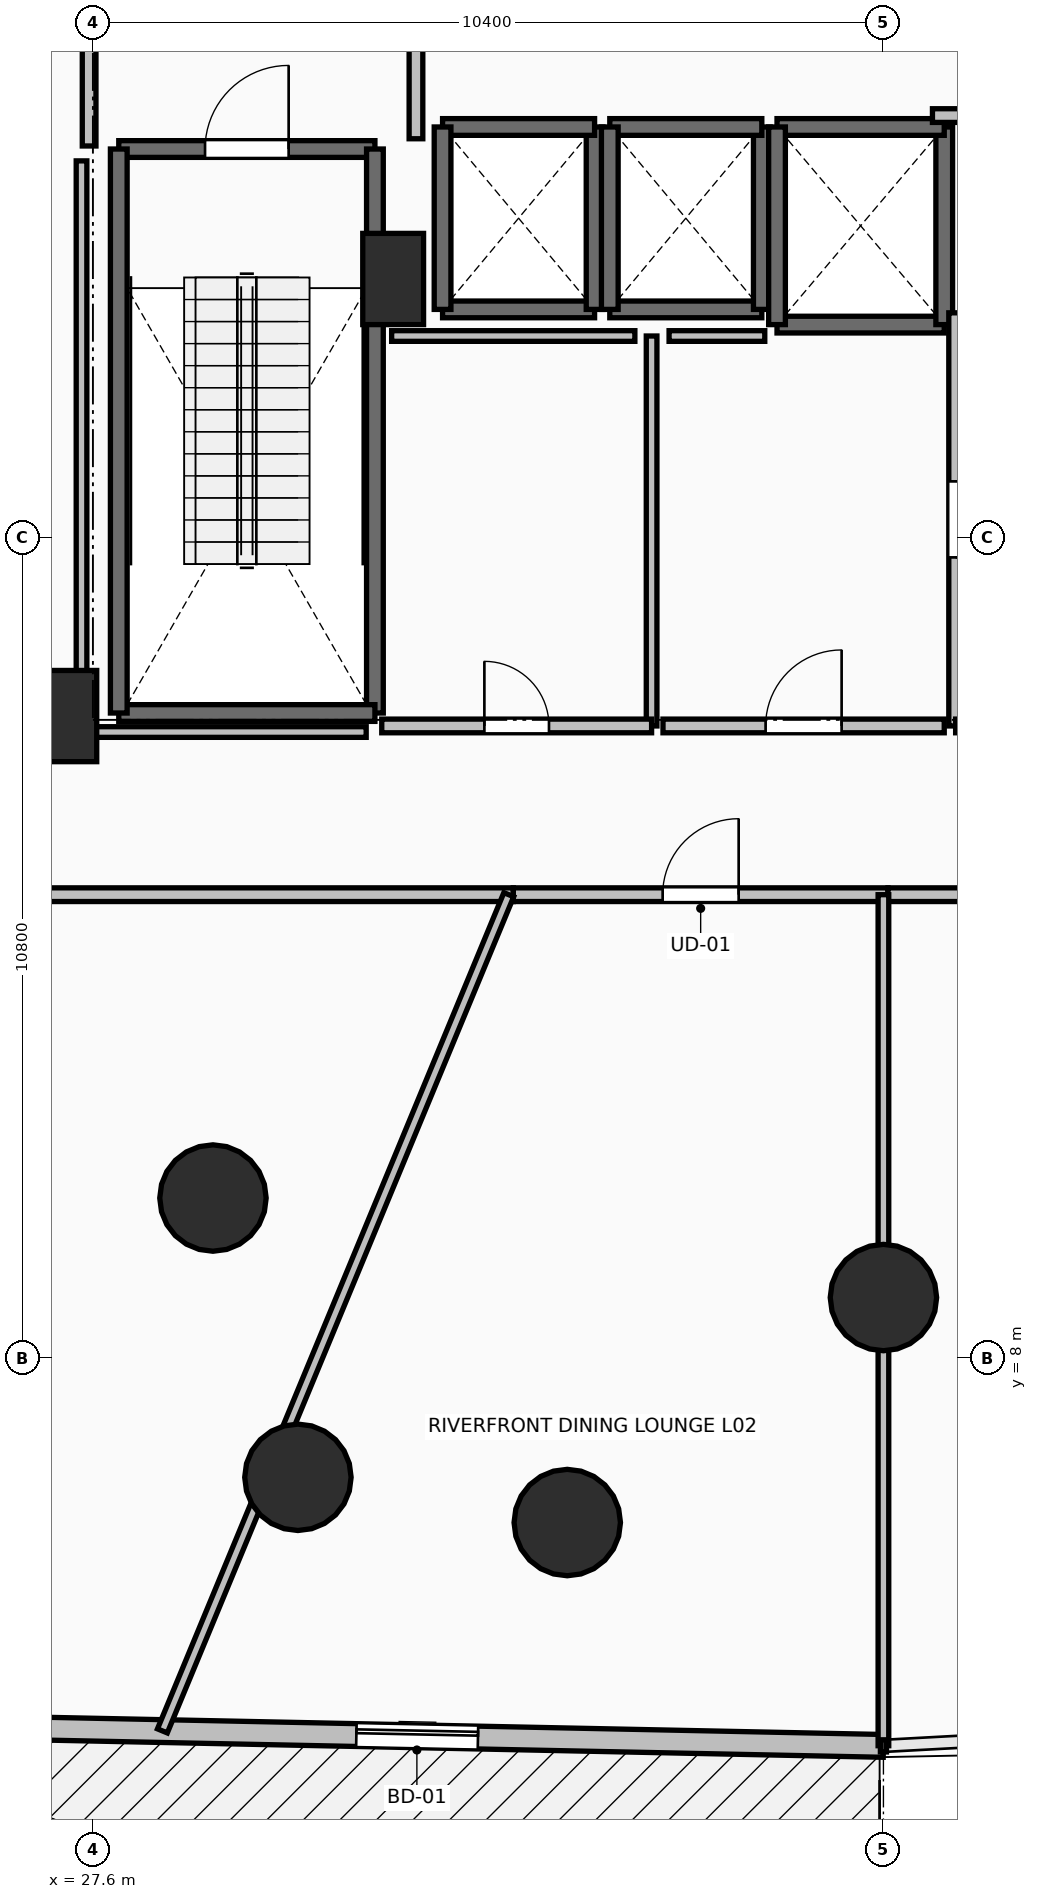
"""IFC4 building model, lengths in metres.
Left out: names, types, materials, properties, quantities, classifications, styles, units other than length and angle.
Written with IfcOpenShell. Run it as: python <this file> out.ifc"""

import sys

from ifc_helpers import new_model, si_unit, direction, frame, frame_2d, origin, origin_2d, place, context, subcontext, project, spatial, rectangle, circle, extrude, element, fill, save


model = new_model("IFC4")
c1 = context("Model", 3, precision=1e-05, world=origin(), true_north=direction((0.0, 1.0)))
c2 = subcontext(c1, "Body", "Model", "MODEL_VIEW")
j1 = project(units=[si_unit("LENGTHUNIT", "METRE"), si_unit("PLANEANGLEUNIT", "RADIAN")], contexts=[c1])
p1 = place(None, origin())
s1 = spatial("IfcSite", under=j1, at=p1, CompositionType="ELEMENT")
p2 = place(p1, origin())
s2 = spatial("IfcBuilding", under=s1, at=p2, CompositionType="ELEMENT")
p3 = place(p2, frame((0.0, 0.0, 9.6)))
s3 = spatial("IfcBuildingStorey", under=s2, at=p3, CompositionType="ELEMENT", Elevation=9.6)
for number, where, z_axis, x_axis in (
    (1, (29.179, 10.109, 0.0), (0.0, 0.0, 1.0), (-0.383, -0.924, 0.0)),
    (2, (38.0, 8.8, 0.0), (0.0, 0.0, 1.0), (0.0, -1.0, 0.0)),
    (3, (30.297, 6.435, 0.0), (0.0, 0.0, 1.0), (-0.383, -0.924, 0.0)),
    (4, (33.84, 5.84, 0.0), (0.0, 0.0, 1.0), (0.0, -1.0, 0.0)),
):
    element("IfcColumn", number, at=place(p3, frame(where, z_axis=z_axis, x_axis=x_axis)), inside=s3, PredefinedType="COLUMN", context=c2, shape_type="SweptSolid", body=[
        extrude(circle(Radius=0.7, at=origin_2d()), origin(), (0.0, 0.0, 1.0), 4.8),
    ])
for number, where, z_axis, x_axis in (
    (5, (27.25, 16.45, 0.0), (0.0, 0.0, 1.0), (1.0, 0.0, 0.0)),
    (6, (31.55, 22.2, 0.0), (0.0, 0.0, 1.0), (1.0, 0.0, 0.0)),
):
    element("IfcColumn", number, at=place(p3, frame(where, z_axis=z_axis, x_axis=x_axis)), inside=s3, PredefinedType="PILASTER", context=c2, shape_type="SweptSolid", body=[
        extrude(rectangle(XDim=0.8, YDim=1.2, at=origin_2d()), origin(), (0.0, 0.0, 1.0), 4.8),
    ])
p4 = place(p3, frame((25.732, 3.154, 0.0), z_axis=(0.0, 0.0, 1.0), x_axis=(0.99978877583, -0.020552462746, 0.0)))
e7 = element("IfcWall", 7, at=p4, inside=s3, PredefinedType="STANDARD", context=c2, shape_type="SweptSolid", body=[
    extrude(rectangle(XDim=12.271, YDim=0.3, at=frame_2d((6.135, 0.0))), origin(), (0.0, 0.0, 1.0), 4.48),
])
p5 = place(p4, frame((5.335, 0.0, 0.0)))
e8 = element("IfcOpeningElement", 8, at=p5, cuts=e7, PredefinedType="OPENING", context=c2, shape_type="SweptSolid", body=[
    extrude(rectangle(XDim=1.6, YDim=2.3, at=frame_2d((0.8, 1.15))), frame((0.0, 0.165, 0.0), z_axis=(0.0, -1.0, 0.0), x_axis=(1.0, 0.0, 0.0)), (0.0, 0.0, 1.0), 0.33),
])
p6 = place(p3, frame((27.94, 23.91, 0.0), z_axis=(0.0, 0.0, 1.0), x_axis=(1.0, 0.0, 0.0)))
e9 = element("IfcWall", 9, at=p6, inside=s3, PredefinedType="SOLIDWALL", context=c2, shape_type="SweptSolid", body=[
    extrude(rectangle(XDim=3.37, YDim=0.22, at=frame_2d((1.685, 0.0))), origin(), (0.0, 0.0, 1.0), 4.48),
])
p7 = place(p6, frame((1.135, 0.0, 0.0)))
e10 = element("IfcOpeningElement", 10, at=p7, cuts=e9, PredefinedType="OPENING", context=c2, shape_type="SweptSolid", body=[
    extrude(rectangle(XDim=1.1, YDim=2.15, at=frame_2d((0.55, 1.075))), frame((0.0, 0.125, 0.0), z_axis=(0.0, -1.0, 0.0), x_axis=(1.0, 0.0, 0.0)), (0.0, 0.0, 1.0), 0.25),
])
p8 = place(p3, frame((31.31, 23.91, 0.0), z_axis=(0.0, 0.0, 1.0), x_axis=(0.0, -1.0, 0.0)))
e11 = element("IfcWall", 11, at=p8, inside=s3, PredefinedType="SOLIDWALL", context=c2, shape_type="SweptSolid", body=[
    extrude(rectangle(XDim=7.42, YDim=0.22, at=frame_2d((3.71, 0.0))), origin(), (0.0, 0.0, 1.0), 4.48),
])
p9 = place(p3, frame((31.31, 16.49, 0.0), z_axis=(0.0, 0.0, 1.0), x_axis=(-1.0, 0.0, 0.0)))
e12 = element("IfcWall", 12, at=p9, inside=s3, PredefinedType="SOLIDWALL", context=c2, shape_type="SweptSolid", body=[
    extrude(rectangle(XDim=3.37, YDim=0.22, at=frame_2d((1.685, 0.0))), origin(), (0.0, 0.0, 1.0), 4.48),
])
p10 = place(p3, frame((27.94, 16.49, 0.0), z_axis=(0.0, 0.0, 1.0), x_axis=(0.0, 1.0, 0.0)))
e13 = element("IfcWall", 13, at=p10, inside=s3, PredefinedType="SOLIDWALL", context=c2, shape_type="SweptSolid", body=[
    extrude(rectangle(XDim=7.42, YDim=0.22, at=frame_2d((3.71, 0.0))), origin(), (0.0, 0.0, 1.0), 4.48),
])
p11 = place(p3, frame((32.2, 21.8, 0.0), z_axis=(0.0, 0.0, 1.0), x_axis=(1.0, 0.0, 0.0)))
e14 = element("IfcWall", 14, at=p11, inside=s3, PredefinedType="SOLIDWALL", context=c2, shape_type="SweptSolid", body=[
    extrude(rectangle(XDim=2.0, YDim=0.22, at=frame_2d((1.0, 0.0))), origin(), (0.0, 0.0, 1.0), 4.48),
])
p12 = place(p3, frame((34.2, 21.8, 0.0), z_axis=(0.0, 0.0, 1.0), x_axis=(0.0, 1.0, 0.0)))
e15 = element("IfcWall", 15, at=p12, inside=s3, PredefinedType="SOLIDWALL", context=c2, shape_type="SweptSolid", body=[
    extrude(rectangle(XDim=2.4, YDim=0.22, at=frame_2d((1.2, 0.0))), origin(), (0.0, 0.0, 1.0), 4.48),
])
p13 = place(p3, frame((34.2, 24.2, 0.0), z_axis=(0.0, 0.0, 1.0), x_axis=(-1.0, 0.0, 0.0)))
e16 = element("IfcWall", 16, at=p13, inside=s3, PredefinedType="SOLIDWALL", context=c2, shape_type="SweptSolid", body=[
    extrude(rectangle(XDim=2.0, YDim=0.22, at=frame_2d((1.0, 0.0))), origin(), (0.0, 0.0, 1.0), 4.48),
])
p14 = place(p3, frame((32.2, 24.2, 0.0), z_axis=(0.0, 0.0, 1.0), x_axis=(0.0, -1.0, 0.0)))
e17 = element("IfcWall", 17, at=p14, inside=s3, PredefinedType="SOLIDWALL", context=c2, shape_type="SweptSolid", body=[
    extrude(rectangle(XDim=2.4, YDim=0.22, at=frame_2d((1.2, 0.0))), origin(), (0.0, 0.0, 1.0), 4.48),
])
p15 = place(p3, frame((34.4, 21.8, 0.0), z_axis=(0.0, 0.0, 1.0), x_axis=(1.0, 0.0, 0.0)))
e18 = element("IfcWall", 18, at=p15, inside=s3, PredefinedType="SOLIDWALL", context=c2, shape_type="SweptSolid", body=[
    extrude(rectangle(XDim=2.0, YDim=0.22, at=frame_2d((1.0, 0.0))), origin(), (0.0, 0.0, 1.0), 4.48),
])
p16 = place(p3, frame((36.4, 21.8, 0.0), z_axis=(0.0, 0.0, 1.0), x_axis=(0.0, 1.0, 0.0)))
e19 = element("IfcWall", 19, at=p16, inside=s3, PredefinedType="SOLIDWALL", context=c2, shape_type="SweptSolid", body=[
    extrude(rectangle(XDim=2.4, YDim=0.22, at=frame_2d((1.2, 0.0))), origin(), (0.0, 0.0, 1.0), 4.48),
])
p17 = place(p3, frame((36.4, 24.2, 0.0), z_axis=(0.0, 0.0, 1.0), x_axis=(-1.0, 0.0, 0.0)))
e20 = element("IfcWall", 20, at=p17, inside=s3, PredefinedType="SOLIDWALL", context=c2, shape_type="SweptSolid", body=[
    extrude(rectangle(XDim=2.0, YDim=0.22, at=frame_2d((1.0, 0.0))), origin(), (0.0, 0.0, 1.0), 4.48),
])
p18 = place(p3, frame((34.4, 24.2, 0.0), z_axis=(0.0, 0.0, 1.0), x_axis=(0.0, -1.0, 0.0)))
e21 = element("IfcWall", 21, at=p18, inside=s3, PredefinedType="SOLIDWALL", context=c2, shape_type="SweptSolid", body=[
    extrude(rectangle(XDim=2.4, YDim=0.22, at=frame_2d((1.2, 0.0))), origin(), (0.0, 0.0, 1.0), 4.48),
])
p19 = place(p3, frame((36.6, 21.6, 0.0), z_axis=(0.0, 0.0, 1.0), x_axis=(1.0, 0.0, 0.0)))
e22 = element("IfcWall", 22, at=p19, inside=s3, PredefinedType="SOLIDWALL", context=c2, shape_type="SweptSolid", body=[
    extrude(rectangle(XDim=2.2, YDim=0.22, at=frame_2d((1.1, 0.0))), origin(), (0.0, 0.0, 1.0), 4.48),
])
p20 = place(p3, frame((38.8, 21.6, 0.0), z_axis=(0.0, 0.0, 1.0), x_axis=(0.0, 1.0, 0.0)))
e23 = element("IfcWall", 23, at=p20, inside=s3, PredefinedType="SOLIDWALL", context=c2, shape_type="SweptSolid", body=[
    extrude(rectangle(XDim=2.6, YDim=0.22, at=frame_2d((1.3, 0.0))), origin(), (0.0, 0.0, 1.0), 4.48),
])
p21 = place(p3, frame((38.8, 24.2, 0.0), z_axis=(0.0, 0.0, 1.0), x_axis=(-1.0, 0.0, 0.0)))
e24 = element("IfcWall", 24, at=p21, inside=s3, PredefinedType="SOLIDWALL", context=c2, shape_type="SweptSolid", body=[
    extrude(rectangle(XDim=2.2, YDim=0.22, at=frame_2d((1.1, 0.0))), origin(), (0.0, 0.0, 1.0), 4.48),
])
p22 = place(p3, frame((36.6, 24.2, 0.0), z_axis=(0.0, 0.0, 1.0), x_axis=(0.0, -1.0, 0.0)))
e25 = element("IfcWall", 25, at=p22, inside=s3, PredefinedType="SOLIDWALL", context=c2, shape_type="SweptSolid", body=[
    extrude(rectangle(XDim=2.6, YDim=0.22, at=frame_2d((1.3, 0.0))), origin(), (0.0, 0.0, 1.0), 4.48),
])
p23 = place(p3, frame((31.85, 24.045, 0.0), z_axis=(0.0, 0.0, 1.0), x_axis=(0.0, 1.0, 0.0)))
e26 = element("IfcWall", 26, at=p23, inside=s3, PredefinedType="PARTITIONING", context=c2, shape_type="SweptSolid", body=[
    extrude(rectangle(XDim=3.91, YDim=0.18, at=frame_2d((1.955, 0.0))), origin(), (0.0, 0.0, 1.0), 4.48),
])
p24 = place(p23, frame((1.355, 0.0, 0.0)))
e27 = element("IfcOpeningElement", 27, at=p24, cuts=e26, PredefinedType="OPENING", context=c2, shape_type="SweptSolid", body=[
    extrude(rectangle(XDim=1.2, YDim=2.15, at=frame_2d((0.6, 1.075))), frame((0.0, 0.105, 0.0), z_axis=(0.0, -1.0, 0.0), x_axis=(1.0, 0.0, 0.0)), (0.0, 0.0, 1.0), 0.21),
])
p25 = place(p3, frame((27.55, 28.0, 0.0), z_axis=(0.0, 0.0, 1.0), x_axis=(0.0, -1.0, 0.0)))
e28 = element("IfcWall", 28, at=p25, inside=s3, PredefinedType="PARTITIONING", context=c2, shape_type="SweptSolid", body=[
    extrude(rectangle(XDim=4.05, YDim=0.18, at=frame_2d((2.025, 0.0))), origin(), (0.0, 0.0, 1.0), 4.48),
])
p26 = place(p25, frame((1.425, 0.0, 0.0)))
e29 = element("IfcOpeningElement", 29, at=p26, cuts=e28, PredefinedType="OPENING", context=c2, shape_type="SweptSolid", body=[
    extrude(rectangle(XDim=1.2, YDim=2.15, at=frame_2d((0.6, 1.075))), frame((0.0, 0.105, 0.0), z_axis=(0.0, -1.0, 0.0), x_axis=(1.0, 0.0, 0.0)), (0.0, 0.0, 1.0), 0.21),
])
p27 = place(p3, frame((38.645, 24.35, 0.0), z_axis=(0.0, 0.0, 1.0), x_axis=(1.0, 0.0, 0.0)))
e30 = element("IfcWall", 30, at=p27, inside=s3, PredefinedType="PARTITIONING", context=c2, shape_type="SweptSolid", body=[
    extrude(rectangle(XDim=2.91, YDim=0.18, at=frame_2d((1.455, 0.0))), origin(), (0.0, 0.0, 1.0), 4.48),
])
p28 = place(p27, frame((0.855, 0.0, 0.0)))
e31 = element("IfcOpeningElement", 31, at=p28, cuts=e30, PredefinedType="OPENING", context=c2, shape_type="SweptSolid", body=[
    extrude(rectangle(XDim=1.2, YDim=2.15, at=frame_2d((0.6, 1.075))), frame((0.0, 0.105, 0.0), z_axis=(0.0, -1.0, 0.0), x_axis=(1.0, 0.0, 0.0)), (0.0, 0.0, 1.0), 0.21),
])
p29 = place(p3, frame((38.95, 21.755, 0.0), z_axis=(0.0, 0.0, 1.0), x_axis=(0.0, -1.0, 0.0)))
e32 = element("IfcWall", 32, at=p29, inside=s3, PredefinedType="PARTITIONING", context=c2, shape_type="SweptSolid", body=[
    extrude(rectangle(XDim=5.435, YDim=0.18, at=frame_2d((2.717, 0.0))), origin(), (0.0, 0.0, 1.0), 4.48),
])
p30 = place(p29, frame((2.218, 0.0, 0.0)))
e33 = element("IfcOpeningElement", 33, at=p30, cuts=e32, PredefinedType="OPENING", context=c2, shape_type="SweptSolid", body=[
    extrude(rectangle(XDim=1.0, YDim=2.15, at=frame_2d((0.5, 1.075))), frame((0.0, 0.105, 0.0), z_axis=(0.0, -1.0, 0.0), x_axis=(1.0, 0.0, 0.0)), (0.0, 0.0, 1.0), 0.21),
])
p31 = place(p3, frame((38.95, 16.32, 0.0), z_axis=(0.0, 0.0, 1.0), x_axis=(1.0, 0.0, 0.0)))
e34 = element("IfcWall", 34, at=p31, inside=s3, PredefinedType="PARTITIONING", context=c2, shape_type="SweptSolid", body=[
    extrude(rectangle(XDim=2.3, YDim=0.18, at=frame_2d((1.15, 0.0))), origin(), (0.0, 0.0, 1.0), 4.48),
])
p32 = place(p31, frame((0.55, 0.0, 0.0)))
e35 = element("IfcOpeningElement", 35, at=p32, cuts=e34, PredefinedType="OPENING", context=c2, shape_type="SweptSolid", body=[
    extrude(rectangle(XDim=1.2, YDim=2.15, at=frame_2d((0.6, 1.075))), frame((0.0, 0.105, 0.0), z_axis=(0.0, -1.0, 0.0), x_axis=(1.0, 0.0, 0.0)), (0.0, 0.0, 1.0), 0.21),
])
p33 = place(p3, frame((34.95, 16.32, 0.0), z_axis=(0.0, 0.0, 1.0), x_axis=(0.0, 1.0, 0.0)))
e36 = element("IfcWall", 36, at=p33, inside=s3, PredefinedType="PARTITIONING", context=c2, shape_type="SweptSolid", body=[
    extrude(rectangle(XDim=5.13, YDim=0.14, at=frame_2d((2.565, 0.0))), origin(), (0.0, 0.0, 1.0), 4.48),
])
p34 = place(p3, frame((31.4, 16.32, 0.0), z_axis=(0.0, 0.0, 1.0), x_axis=(1.0, 0.0, 0.0)))
e37 = element("IfcWall", 37, at=p34, inside=s3, PredefinedType="PARTITIONING", context=c2, shape_type="SweptSolid", body=[
    extrude(rectangle(XDim=3.55, YDim=0.18, at=frame_2d((1.775, 0.0))), origin(), (0.0, 0.0, 1.0), 4.48),
])
p35 = place(p34, frame((1.35, 0.0, 0.0)))
e38 = element("IfcOpeningElement", 38, at=p35, cuts=e37, PredefinedType="OPENING", context=c2, shape_type="SweptSolid", body=[
    extrude(rectangle(XDim=0.85, YDim=2.1, at=frame_2d((0.425, 1.05))), frame((0.0, 0.105, 0.0), z_axis=(0.0, -1.0, 0.0), x_axis=(1.0, 0.0, 0.0)), (0.0, 0.0, 1.0), 0.21),
])
p36 = place(p3, frame((35.1, 16.32, 0.0), z_axis=(0.0, 0.0, 1.0), x_axis=(1.0, 0.0, 0.0)))
e39 = element("IfcWall", 39, at=p36, inside=s3, PredefinedType="PARTITIONING", context=c2, shape_type="SweptSolid", body=[
    extrude(rectangle(XDim=3.7, YDim=0.18, at=frame_2d((1.85, 0.0))), origin(), (0.0, 0.0, 1.0), 4.48),
])
p37 = place(p36, frame((1.35, 0.0, 0.0)))
e40 = element("IfcOpeningElement", 40, at=p37, cuts=e39, PredefinedType="OPENING", context=c2, shape_type="SweptSolid", body=[
    extrude(rectangle(XDim=1.0, YDim=2.15, at=frame_2d((0.5, 1.075))), frame((0.0, 0.105, 0.0), z_axis=(0.0, -1.0, 0.0), x_axis=(1.0, 0.0, 0.0)), (0.0, 0.0, 1.0), 0.21),
])
p38 = place(p3, frame((25.25, 14.1, 0.0), z_axis=(0.0, 0.0, 1.0), x_axis=(1.0, 0.0, 0.0)))
e41 = element("IfcWall", 41, at=p38, inside=s3, PredefinedType="PARTITIONING", context=c2, shape_type="SweptSolid", body=[
    extrude(rectangle(XDim=7.881, YDim=0.18, at=frame_2d((3.94, 0.0))), origin(), (0.0, 0.0, 1.0), 3.672),
])
p39 = place(p3, frame((33.131, 14.1, 0.0), z_axis=(0.0, 0.0, 1.0), x_axis=(1.0, 0.0, 0.0)))
e42 = element("IfcWall", 42, at=p39, inside=s3, PredefinedType="PARTITIONING", context=c2, shape_type="SweptSolid", body=[
    extrude(rectangle(XDim=4.929, YDim=0.18, at=frame_2d((2.464, 0.0))), origin(), (0.0, 0.0, 1.0), 4.48),
])
p40 = place(p39, frame((1.965, 0.0, 0.0)))
e43 = element("IfcOpeningElement", 43, at=p40, cuts=e42, PredefinedType="OPENING", context=c2, shape_type="SweptSolid", body=[
    extrude(rectangle(XDim=1.0, YDim=2.15, at=frame_2d((0.5, 1.075))), frame((0.0, 0.105, 0.0), z_axis=(0.0, -1.0, 0.0), x_axis=(1.0, 0.0, 0.0)), (0.0, 0.0, 1.0), 0.21),
])
p41 = place(p3, frame((38.06, 14.1, 0.0), z_axis=(0.0, 0.0, 1.0), x_axis=(1.0, 0.0, 0.0)))
e44 = element("IfcWall", 44, at=p41, inside=s3, PredefinedType="PARTITIONING", context=c2, shape_type="SweptSolid", body=[
    extrude(rectangle(XDim=4.14, YDim=0.18, at=frame_2d((2.07, 0.0))), origin(), (0.0, 0.0, 1.0), 4.48),
])
p42 = place(p41, frame((1.57, 0.0, 0.0)))
e45 = element("IfcOpeningElement", 45, at=p42, cuts=e44, PredefinedType="OPENING", context=c2, shape_type="SweptSolid", body=[
    extrude(rectangle(XDim=1.0, YDim=2.15, at=frame_2d((0.5, 1.075))), frame((0.0, 0.105, 0.0), z_axis=(0.0, -1.0, 0.0), x_axis=(1.0, 0.0, 0.0)), (0.0, 0.0, 1.0), 0.21),
])
p43 = place(p3, frame((28.514, 3.099, 0.0), z_axis=(0.0, 0.0, 1.0), x_axis=(0.38271032831, 0.923868391388, 0.0)))
e46 = element("IfcWall", 46, at=p43, inside=s3, PredefinedType="PARTITIONING", context=c2, shape_type="SweptSolid", body=[
    extrude(rectangle(XDim=11.907, YDim=0.14, at=frame_2d((5.954, 0.0))), origin(), (0.0, 0.0, 1.0), 3.672),
])
p44 = place(p3, frame((38.0, 2.904, 0.0), z_axis=(0.0, 0.0, 1.0), x_axis=(0.0, 1.0, 0.0)))
e47 = element("IfcWall", 47, at=p44, inside=s3, PredefinedType="PARTITIONING", context=c2, shape_type="SweptSolid", body=[
    extrude(rectangle(XDim=11.196, YDim=0.14, at=frame_2d((5.598, 0.0))), origin(), (0.0, 0.0, 1.0), 3.672),
])
p45 = place(p3, frame((34.73, 21.45, 0.0), z_axis=(0.0, 0.0, 1.0), x_axis=(-1.0, 0.0, 0.0)))
e48 = element("IfcWall", 48, at=p45, inside=s3, PredefinedType="PARTITIONING", context=c2, shape_type="SweptSolid", body=[
    extrude(rectangle(XDim=3.2, YDim=0.14, at=frame_2d((1.6, 0.0))), origin(), (0.0, 0.0, 1.0), 4.48),
])
p46 = place(p3, frame((36.439, 21.45, 0.0), z_axis=(0.0, 0.0, 1.0), x_axis=(-1.0, 0.0, 0.0)))
e49 = element("IfcWall", 49, at=p46, inside=s3, PredefinedType="PARTITIONING", context=c2, shape_type="SweptSolid", body=[
    extrude(rectangle(XDim=1.259, YDim=0.14, at=frame_2d((0.629, 0.0))), origin(), (0.0, 0.0, 1.0), 4.48),
])
p47 = place(p3, frame((31.195, 16.24, 0.0), z_axis=(0.0, 0.0, 1.0), x_axis=(-1.0, 0.0, 0.0)))
e50 = element("IfcWall", 50, at=p47, inside=s3, PredefinedType="PARTITIONING", context=c2, shape_type="SweptSolid", body=[
    extrude(rectangle(XDim=3.745, YDim=0.14, at=frame_2d((1.873, 0.0))), origin(), (0.0, 0.0, 1.0), 3.672),
])
p48 = place(p3, frame((27.45, 16.24, 0.0), z_axis=(0.0, 0.0, 1.0), x_axis=(0.0, 1.0, 0.0)))
e51 = element("IfcWall", 51, at=p48, inside=s3, PredefinedType="PARTITIONING", context=c2, shape_type="SweptSolid", body=[
    extrude(rectangle(XDim=7.514, YDim=0.14, at=frame_2d((3.757, 0.0))), origin(), (0.0, 0.0, 1.0), 2.406),
])
p49 = place(p5, origin())
e52 = element("IfcDoor", 52, at=p49, inside=s3, OperationType="SLIDING_TO_LEFT", PredefinedType="DOOR", context=c2, shape_type="SweptSolid", body=[
    extrude(rectangle(XDim=1.6, YDim=2.3, at=frame_2d((0.8, 1.15))), frame((0.0, 0.025, 0.0), z_axis=(0.0, -1.0, 0.0), x_axis=(1.0, 0.0, 0.0)), (0.0, 0.0, 1.0), 0.05),
])
fill(e8, e52)
p50 = place(p7, origin())
e53 = element("IfcDoor", 53, at=p50, inside=s3, OperationType="SINGLE_SWING_RIGHT", PredefinedType="DOOR", context=c2, shape_type="SweptSolid", body=[
    extrude(rectangle(XDim=1.1, YDim=2.15, at=frame_2d((0.55, 1.075))), frame((0.0, 0.025, 0.0), z_axis=(0.0, -1.0, 0.0), x_axis=(1.0, 0.0, 0.0)), (0.0, 0.0, 1.0), 0.05),
])
fill(e10, e53)
p51 = place(p30, origin())
e54 = element("IfcDoor", 54, at=p51, inside=s3, OperationType="SINGLE_SWING_RIGHT", PredefinedType="DOOR", context=c2, shape_type="SweptSolid", body=[
    extrude(rectangle(XDim=1.0, YDim=2.15, at=frame_2d((0.5, 1.075))), frame((0.0, 0.025, 0.0), z_axis=(0.0, -1.0, 0.0), x_axis=(1.0, 0.0, 0.0)), (0.0, 0.0, 1.0), 0.05),
])
fill(e33, e54)
p52 = place(p35, origin())
e55 = element("IfcDoor", 55, at=p52, inside=s3, OperationType="SINGLE_SWING_LEFT", PredefinedType="DOOR", context=c2, shape_type="SweptSolid", body=[
    extrude(rectangle(XDim=0.85, YDim=2.1, at=frame_2d((0.425, 1.05))), frame((0.0, 0.025, 0.0), z_axis=(0.0, -1.0, 0.0), x_axis=(1.0, 0.0, 0.0)), (0.0, 0.0, 1.0), 0.05),
])
fill(e38, e55)
p53 = place(p37, origin())
e56 = element("IfcDoor", 56, at=p53, inside=s3, OperationType="SINGLE_SWING_RIGHT", PredefinedType="DOOR", context=c2, shape_type="SweptSolid", body=[
    extrude(rectangle(XDim=1.0, YDim=2.15, at=frame_2d((0.5, 1.075))), frame((0.0, 0.025, 0.0), z_axis=(0.0, -1.0, 0.0), x_axis=(1.0, 0.0, 0.0)), (0.0, 0.0, 1.0), 0.05),
])
fill(e40, e56)
p54 = place(p40, origin())
e57 = element("IfcDoor", 57, at=p54, inside=s3, OperationType="SINGLE_SWING_RIGHT", PredefinedType="DOOR", context=c2, shape_type="SweptSolid", body=[
    extrude(rectangle(XDim=1.0, YDim=2.15, at=frame_2d((0.5, 1.075))), frame((0.0, 0.025, 0.0), z_axis=(0.0, -1.0, 0.0), x_axis=(1.0, 0.0, 0.0)), (0.0, 0.0, 1.0), 0.05),
])
fill(e43, e57)
save(model, sys.argv[1])
